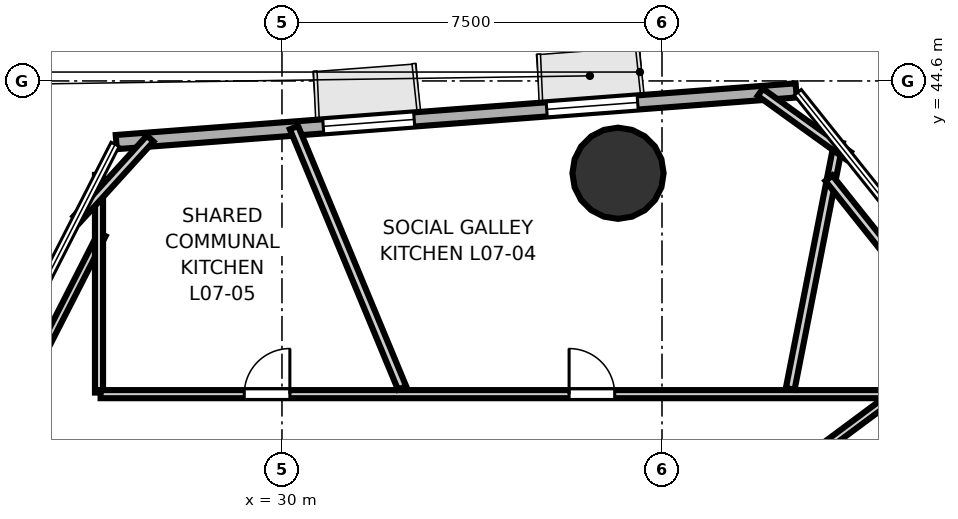
"""IFC4 building model, lengths in metres.
Left out: names, types, materials, properties, quantities, classifications, styles, units other than length and angle.
Written with IfcOpenShell. Run it as: python <this file> out.ifc"""

import sys

from ifc_helpers import new_model, si_unit, direction, frame, frame_2d, origin, origin_2d, place, context, subcontext, project, spatial, rectangle, hollow_circle, extrude, element, fill, save


model = new_model("IFC4")
c1 = context("Model", 3, precision=1e-05, world=origin(), true_north=direction((0.0, 1.0)))
c2 = subcontext(c1, "Body", "Model", "MODEL_VIEW")
j1 = project(units=[si_unit("LENGTHUNIT", "METRE"), si_unit("PLANEANGLEUNIT", "RADIAN")], contexts=[c1])
p1 = place(None, origin())
s1 = spatial("IfcSite", under=j1, at=p1, CompositionType="ELEMENT")
p2 = place(p1, origin())
s2 = spatial("IfcBuilding", under=s1, at=p2, CompositionType="ELEMENT")
p3 = place(p2, frame((0.0, 0.0, 33.1)))
s3 = spatial("IfcBuildingStorey", under=s2, at=p3, CompositionType="ELEMENT", Elevation=33.1)
p4 = place(p3, frame((36.632, 42.778, 0.0), z_axis=(0.0, 0.0, 1.0), x_axis=(1.0, 0.0, 0.0)))
e1 = element("IfcColumn", 1, at=p4, inside=s3, PredefinedType="COLUMN", context=c2, shape_type="SweptSolid", body=[
    extrude(hollow_circle(Radius=0.9, WallThickness=0.045, at=origin_2d()), origin(), (0.0, 0.0, 1.0), 3.7),
])
p5 = place(p3, frame((40.147, 44.413, 0.0), z_axis=(0.0, 0.0, 1.0), x_axis=(-0.997124396063, -0.07578217981, 0.0)))
e2 = element("IfcWall", 2, at=p5, inside=s3, PredefinedType="SOLIDWALL", context=c2, shape_type="SweptSolid", body=[
    extrude(rectangle(XDim=13.457, YDim=0.28, at=frame_2d((6.728, 0.0))), origin(), (0.0, 0.0, 1.0), 3.52),
])
p6 = place(p5, frame((3.137, 0.0, 0.85)))
e3 = element("IfcOpeningElement", 3, at=p6, cuts=e2, PredefinedType="OPENING", context=c2, shape_type="SweptSolid", body=[
    extrude(rectangle(XDim=1.8, YDim=2.1, at=frame_2d((0.9, 1.05))), frame((0.0, 0.15, 0.0), z_axis=(0.0, -1.0, 0.0), x_axis=(1.0, 0.0, 0.0)), (0.0, 0.0, 1.0), 0.3),
])
p7 = place(p5, frame((7.56, 0.0, 0.85)))
e4 = element("IfcOpeningElement", 4, at=p7, cuts=e2, PredefinedType="OPENING", context=c2, shape_type="SweptSolid", body=[
    extrude(rectangle(XDim=1.8, YDim=2.1, at=frame_2d((0.9, 1.05))), frame((0.0, 0.15, 0.0), z_axis=(0.0, -1.0, 0.0), x_axis=(1.0, 0.0, 0.0)), (0.0, 0.0, 1.0), 0.3),
])
p8 = place(p3, frame((23.578, 35.951, 0.0), z_axis=(0.0, 0.0, 1.0), x_axis=(0.454592450263, 0.890699558866, 0.0)))
e5 = element("IfcWall", 5, at=p8, inside=s3, PredefinedType="PARTITIONING", context=c2, shape_type="SweptSolid", body=[
    extrude(rectangle(XDim=6.313, YDim=0.16, at=frame_2d((3.156, 0.0))), origin(), (0.0, 0.0, 1.0), 2.84),
])
p9 = place(p3, frame((26.389, 42.746, 0.0), z_axis=(0.0, 0.0, 1.0), x_axis=(0.0, -1.0, 0.0)))
e6 = element("IfcWall", 6, at=p9, inside=s3, PredefinedType="PARTITIONING", context=c2, shape_type="SweptSolid", body=[
    extrude(rectangle(XDim=4.296, YDim=0.16, at=frame_2d((2.148, 0.0))), origin(), (0.0, 0.0, 1.0), 2.84),
])
p10 = place(p3, frame((26.42, 38.419, 0.0), z_axis=(0.0, 0.0, 1.0), x_axis=(1.0, 0.0, 0.0)))
e7 = element("IfcWall", 7, at=p10, inside=s3, PredefinedType="PARTITIONING", context=c2, shape_type="SweptSolid", body=[
    extrude(rectangle(XDim=15.783, YDim=0.16, at=frame_2d((7.892, 0.0))), origin(), (0.0, 0.0, 1.0), 2.798),
])
p11 = place(p10, frame((9.246, 0.0, 0.0)))
e8 = element("IfcOpeningElement", 8, at=p11, cuts=e7, PredefinedType="OPENING", context=c2, shape_type="SweptSolid", body=[
    extrude(rectangle(XDim=0.9, YDim=2.1, at=frame_2d((0.45, 1.05))), frame((0.0, 0.09, 0.0), z_axis=(0.0, -1.0, 0.0), x_axis=(1.0, 0.0, 0.0)), (0.0, 0.0, 1.0), 0.18),
])
p12 = place(p10, frame((2.836, 0.0, 0.0)))
e9 = element("IfcOpeningElement", 9, at=p12, cuts=e7, PredefinedType="OPENING", context=c2, shape_type="SweptSolid", body=[
    extrude(rectangle(XDim=0.9, YDim=2.1, at=frame_2d((0.45, 1.05))), frame((0.0, 0.09, 0.0), z_axis=(0.0, -1.0, 0.0), x_axis=(1.0, 0.0, 0.0)), (0.0, 0.0, 1.0), 0.18),
])
p13 = place(p3, frame((42.185, 38.475, 0.0), z_axis=(0.0, 0.0, 1.0), x_axis=(-0.802818467394, -0.596223538961, 0.0)))
e10 = element("IfcWall", 10, at=p13, inside=s3, PredefinedType="PARTITIONING", context=c2, shape_type="SweptSolid", body=[
    extrude(rectangle(XDim=2.953, YDim=0.16, at=frame_2d((1.477, 0.0))), origin(), (0.0, 0.0, 1.0), 2.798),
])
p14 = place(p3, frame((40.031, 38.524, 0.0), z_axis=(0.0, 0.0, 1.0), x_axis=(0.192440494931, 0.981308644571, 0.0)))
e11 = element("IfcWall", 11, at=p14, inside=s3, PredefinedType="PLUMBINGWALL", context=c2, shape_type="SweptSolid", body=[
    extrude(rectangle(XDim=4.958, YDim=0.175, at=frame_2d((2.479, 0.0))), origin(), (0.0, 0.0, 1.0), 2.798),
])
p15 = place(p3, frame((40.794, 42.681, 0.0), z_axis=(0.0, 0.0, 1.0), x_axis=(0.623977950445, -0.781441947529, 0.0)))
e12 = element("IfcWall", 12, at=p15, inside=s3, PredefinedType="PLUMBINGWALL", context=c2, shape_type="SweptSolid", body=[
    extrude(rectangle(XDim=11.588, YDim=0.175, at=frame_2d((5.794, 0.0))), origin(), (0.0, 0.0, 1.0), 2.798),
])
p16 = place(p3, frame((39.44, 44.376, 0.0), z_axis=(0.0, 0.0, 1.0), x_axis=(0.81138921051, -0.584506243822, 0.0)))
e13 = element("IfcWall", 13, at=p16, inside=s3, PredefinedType="PLUMBINGWALL", context=c2, shape_type="SweptSolid", body=[
    extrude(rectangle(XDim=2.138, YDim=0.175, at=frame_2d((1.069, 0.0))), origin(), (0.0, 0.0, 1.0), 2.84),
])
p17 = place(p3, frame((32.37, 38.542, 0.0), z_axis=(0.0, 0.0, 1.0), x_axis=(-0.383564864304, 0.923513938645, 0.0)))
e14 = element("IfcWall", 14, at=p17, inside=s3, PredefinedType="PLUMBINGWALL", context=c2, shape_type="SweptSolid", body=[
    extrude(rectangle(XDim=5.562, YDim=0.175, at=frame_2d((2.781, 0.0))), origin(), (0.0, 0.0, 1.0), 2.798),
])
p18 = place(p3, frame((25.952, 41.869, 0.0), z_axis=(0.0, 0.0, 1.0), x_axis=(0.672672793996, 0.739940073396, 0.0)))
e15 = element("IfcWall", 15, at=p18, inside=s3, PredefinedType="PLUMBINGWALL", context=c2, shape_type="SweptSolid", body=[
    extrude(rectangle(XDim=2.152, YDim=0.175, at=frame_2d((1.076, 0.0))), origin(), (0.0, 0.0, 1.0), 2.84),
])
p19 = place(p11, origin())
e16 = element("IfcDoor", 16, at=p19, inside=s3, OperationType="SINGLE_SWING_LEFT", PredefinedType="DOOR", context=c2, shape_type="SweptSolid", body=[
    extrude(rectangle(XDim=0.9, YDim=2.1, at=frame_2d((0.45, 1.05))), frame((0.0, 0.025, 0.0), z_axis=(0.0, -1.0, 0.0), x_axis=(1.0, 0.0, 0.0)), (0.0, 0.0, 1.0), 0.05),
])
fill(e8, e16)
p20 = place(p12, origin())
e17 = element("IfcDoor", 17, at=p20, inside=s3, OperationType="SINGLE_SWING_RIGHT", PredefinedType="DOOR", context=c2, shape_type="SweptSolid", body=[
    extrude(rectangle(XDim=0.9, YDim=2.1, at=frame_2d((0.45, 1.05))), frame((0.0, 0.025, 0.0), z_axis=(0.0, -1.0, 0.0), x_axis=(1.0, 0.0, 0.0)), (0.0, 0.0, 1.0), 0.05),
])
fill(e9, e17)
p21 = place(p6, origin())
e18 = element("IfcWindow", 18, at=p21, inside=s3, PartitioningType="SINGLE_PANEL", PredefinedType="WINDOW", context=c2, shape_type="SweptSolid", body=[
    extrude(rectangle(XDim=1.8, YDim=2.1, at=frame_2d((0.9, 1.05))), frame((0.0, 0.03, 0.0), z_axis=(0.0, -1.0, 0.0), x_axis=(1.0, 0.0, 0.0)), (0.0, 0.0, 1.0), 0.06),
])
fill(e3, e18)
p22 = place(p7, origin())
e19 = element("IfcWindow", 19, at=p22, inside=s3, PartitioningType="SINGLE_PANEL", PredefinedType="WINDOW", context=c2, shape_type="SweptSolid", body=[
    extrude(rectangle(XDim=1.8, YDim=2.1, at=frame_2d((0.9, 1.05))), frame((0.0, 0.03, 0.0), z_axis=(0.0, -1.0, 0.0), x_axis=(1.0, 0.0, 0.0)), (0.0, 0.0, 1.0), 0.06),
])
fill(e4, e19)
save(model, sys.argv[1])
